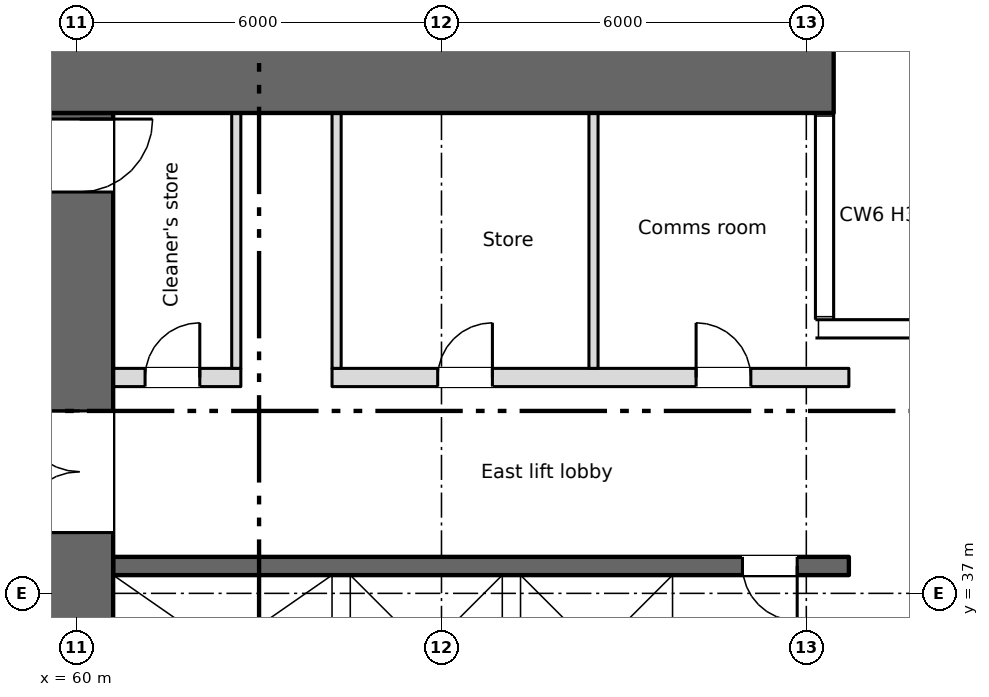
"""IFC4 building model, lengths in metres.
Left out: names, types, materials, properties, quantities, classifications, styles, units other than length and angle.
Written with IfcOpenShell. Run it as: python <this file> out.ifc"""

import sys

from ifc_helpers import new_model, si_unit, direction, frame, frame_2d, origin, place, context, subcontext, project, spatial, rectangle, extrude, element, fill, save


model = new_model("IFC4")
c1 = context("Model", 3, precision=1e-05, world=origin(), true_north=direction((0.0, 1.0)))
c2 = subcontext(c1, "Body", "Model", "MODEL_VIEW")
j1 = project(units=[si_unit("LENGTHUNIT", "METRE"), si_unit("PLANEANGLEUNIT", "RADIAN")], contexts=[c1])
p1 = place(None, origin())
s1 = spatial("IfcSite", under=j1, at=p1, CompositionType="ELEMENT")
p2 = place(p1, origin())
s2 = spatial("IfcBuilding", under=s1, at=p2, CompositionType="ELEMENT")
p3 = place(p2, frame((0.0, 0.0, 17.9)))
s3 = spatial("IfcBuildingStorey", under=s2, at=p3, CompositionType="ELEMENT", Elevation=17.9)
p4 = place(p3, frame((5.55, 45.45, 0.0), z_axis=(0.0, 0.0, 1.0), x_axis=(1.0, 0.0, 0.0)))
e1 = element("IfcWall", 1, at=p4, inside=s3, PredefinedType="SHEAR", context=c2, shape_type="SweptSolid", body=[
    extrude(rectangle(XDim=66.9, YDim=1.1, at=frame_2d((33.45, 0.0))), origin(), (0.0, 0.0, 1.0), 3.8),
])
p5 = place(p4, frame((1.2, 0.0, 0.6)))
e2 = element("IfcOpeningElement", 2, at=p5, cuts=e1, PredefinedType="OPENING", context=c2, shape_type="SweptSolid", body=[
    extrude(rectangle(XDim=0.6, YDim=2.7, at=frame_2d((0.3, 1.35))), frame((0.0, 0.56, 0.0), z_axis=(0.0, -1.0, 0.0), x_axis=(1.0, 0.0, 0.0)), (0.0, 0.0, 1.0), 1.12),
])
p6 = place(p4, frame((7.2, 0.0, 0.6)))
e3 = element("IfcOpeningElement", 3, at=p6, cuts=e1, PredefinedType="OPENING", context=c2, shape_type="SweptSolid", body=[
    extrude(rectangle(XDim=0.6, YDim=2.7, at=frame_2d((0.3, 1.35))), frame((0.0, 0.56, 0.0), z_axis=(0.0, -1.0, 0.0), x_axis=(1.0, 0.0, 0.0)), (0.0, 0.0, 1.0), 1.12),
])
p7 = place(p3, frame((72.85, 28.4, 0.0), z_axis=(0.0, 0.0, 1.0), x_axis=(0.0, 1.0, 0.0)))
e4 = element("IfcWall", 4, at=p7, inside=s3, PredefinedType="SHEAR", context=c2, shape_type="SweptSolid", body=[
    extrude(rectangle(XDim=12.85, YDim=0.3, at=frame_2d((6.425, 0.0))), origin(), (0.0, 0.0, 1.0), 3.8),
])
p8 = place(p3, frame((64.35, 34.8, 0.0), z_axis=(0.0, 0.0, 1.0), x_axis=(0.0, 1.0, 0.0)))
e5 = element("IfcWall", 5, at=p8, inside=s3, PredefinedType="SHEAR", context=c2, shape_type="SweptSolid", body=[
    extrude(rectangle(XDim=2.5, YDim=0.3, at=frame_2d((1.25, 0.0))), origin(), (0.0, 0.0, 1.0), 3.8),
])
p9 = place(p3, frame((60.05, 28.4, 0.0), z_axis=(0.0, 0.0, 1.0), x_axis=(0.0, 1.0, 0.0)))
e6 = element("IfcWall", 6, at=p9, inside=s3, PredefinedType="SHEAR", context=c2, shape_type="SweptSolid", body=[
    extrude(rectangle(XDim=16.5, YDim=1.1, at=frame_2d((8.25, 0.0))), origin(), (0.0, 0.0, 1.0), 3.8),
])
p10 = place(p9, frame((9.6, 0.0, 0.0)))
e7 = element("IfcOpeningElement", 7, at=p10, cuts=e6, PredefinedType="OPENING", context=c2, shape_type="SweptSolid", body=[
    extrude(rectangle(XDim=2.0, YDim=2.1, at=frame_2d((1.0, 1.05))), frame((0.0, 0.56, 0.0), z_axis=(0.0, -1.0, 0.0), x_axis=(1.0, 0.0, 0.0)), (0.0, 0.0, 1.0), 1.12),
])
p11 = place(p9, frame((15.2, 0.0, 0.0)))
e8 = element("IfcOpeningElement", 8, at=p11, cuts=e6, PredefinedType="OPENING", context=c2, shape_type="SweptSolid", body=[
    extrude(rectangle(XDim=1.2, YDim=2.1, at=frame_2d((0.6, 1.05))), frame((0.0, 0.56, 0.0), z_axis=(0.0, -1.0, 0.0), x_axis=(1.0, 0.0, 0.0)), (0.0, 0.0, 1.0), 1.12),
])
p12 = place(p3, frame((72.7, 37.45, 0.0), z_axis=(0.0, 0.0, 1.0), x_axis=(-1.0, 0.0, 0.0)))
e9 = element("IfcWall", 9, at=p12, inside=s3, PredefinedType="SHEAR", context=c2, shape_type="SweptSolid", body=[
    extrude(rectangle(XDim=12.1, YDim=0.3, at=frame_2d((6.05, 0.0))), origin(), (0.0, 0.0, 1.0), 3.8),
])
p13 = place(p12, frame((0.85, 0.0, 0.0)))
e10 = element("IfcOpeningElement", 10, at=p13, cuts=e9, PredefinedType="OPENING", context=c2, shape_type="SweptSolid", body=[
    extrude(rectangle(XDim=0.9, YDim=2.1, at=frame_2d((0.45, 1.05))), frame((0.0, 0.16, 0.0), z_axis=(0.0, -1.0, 0.0), x_axis=(1.0, 0.0, 0.0)), (0.0, 0.0, 1.0), 0.32),
])
p14 = place(p12, frame((9.75, 0.0, 0.0)))
e11 = element("IfcOpeningElement", 11, at=p14, cuts=e9, PredefinedType="OPENING", context=c2, shape_type="SweptSolid", body=[
    extrude(rectangle(XDim=1.1, YDim=2.1, at=frame_2d((0.55, 1.05))), frame((0.0, 0.16, 0.0), z_axis=(0.0, -1.0, 0.0), x_axis=(1.0, 0.0, 0.0)), (0.0, 0.0, 1.0), 0.32),
])
p15 = place(p12, frame((6.4, 0.0, 0.0)))
e12 = element("IfcOpeningElement", 12, at=p15, cuts=e9, PredefinedType="OPENING", context=c2, shape_type="SweptSolid", body=[
    extrude(rectangle(XDim=1.1, YDim=2.1, at=frame_2d((0.55, 1.05))), frame((0.0, 0.16, 0.0), z_axis=(0.0, -1.0, 0.0), x_axis=(1.0, 0.0, 0.0)), (0.0, 0.0, 1.0), 0.32),
])
p16 = place(p12, frame((3.6, 0.0, 0.0)))
e13 = element("IfcOpeningElement", 13, at=p16, cuts=e9, PredefinedType="OPENING", context=c2, shape_type="SweptSolid", body=[
    extrude(rectangle(XDim=1.1, YDim=2.1, at=frame_2d((0.55, 1.05))), frame((0.0, 0.16, 0.0), z_axis=(0.0, -1.0, 0.0), x_axis=(1.0, 0.0, 0.0)), (0.0, 0.0, 1.0), 0.32),
])
p17 = place(p3, frame((60.6, 40.55, 0.0), z_axis=(0.0, 0.0, 1.0), x_axis=(1.0, 0.0, 0.0)))
e14 = element("IfcWall", 14, at=p17, inside=s3, PredefinedType="PARTITIONING", context=c2, shape_type="SweptSolid", body=[
    extrude(rectangle(XDim=2.1, YDim=0.3, at=frame_2d((1.05, 0.0))), origin(), (0.0, 0.0, 1.0), 3.8),
])
p18 = place(p17, frame((0.525, 0.0, 0.0)))
e15 = element("IfcOpeningElement", 15, at=p18, cuts=e14, PredefinedType="OPENING", context=c2, shape_type="SweptSolid", body=[
    extrude(rectangle(XDim=0.9, YDim=2.1, at=frame_2d((0.45, 1.05))), frame((0.0, 0.16, 0.0), z_axis=(0.0, -1.0, 0.0), x_axis=(1.0, 0.0, 0.0)), (0.0, 0.0, 1.0), 0.32),
])
p19 = place(p3, frame((64.2, 40.55, 0.0), z_axis=(0.0, 0.0, 1.0), x_axis=(1.0, 0.0, 0.0)))
e16 = element("IfcWall", 16, at=p19, inside=s3, PredefinedType="PARTITIONING", context=c2, shape_type="SweptSolid", body=[
    extrude(rectangle(XDim=8.5, YDim=0.3, at=frame_2d((4.25, 0.0))), origin(), (0.0, 0.0, 1.0), 3.8),
])
p20 = place(p19, frame((1.738, 0.0, 0.0)))
e17 = element("IfcOpeningElement", 17, at=p20, cuts=e16, PredefinedType="OPENING", context=c2, shape_type="SweptSolid", body=[
    extrude(rectangle(XDim=0.9, YDim=2.1, at=frame_2d((0.45, 1.05))), frame((0.0, 0.16, 0.0), z_axis=(0.0, -1.0, 0.0), x_axis=(1.0, 0.0, 0.0)), (0.0, 0.0, 1.0), 0.32),
])
p21 = place(p19, frame((5.988, 0.0, 0.0)))
e18 = element("IfcOpeningElement", 18, at=p21, cuts=e16, PredefinedType="OPENING", context=c2, shape_type="SweptSolid", body=[
    extrude(rectangle(XDim=0.9, YDim=2.1, at=frame_2d((0.45, 1.05))), frame((0.0, 0.16, 0.0), z_axis=(0.0, -1.0, 0.0), x_axis=(1.0, 0.0, 0.0)), (0.0, 0.0, 1.0), 0.32),
])
for number, where, z_axis, x_axis in (
    (19, (67.15, 34.8, 0.0), (0.0, 0.0, 1.0), (0.0, 1.0, 0.0)),
    (20, (69.95, 34.8, 0.0), (0.0, 0.0, 1.0), (0.0, 1.0, 0.0)),
):
    element("IfcWall", number, at=place(p3, frame(where, z_axis=z_axis, x_axis=x_axis)), inside=s3, PredefinedType="SHEAR", context=c2, shape_type="SweptSolid", body=[
        extrude(rectangle(XDim=2.5, YDim=0.3, at=frame_2d((1.25, 0.0))), origin(), (0.0, 0.0, 1.0), 3.8),
    ])
for number, where, z_axis, x_axis in (
    (21, (62.625, 40.7, 0.0), (0.0, 0.0, 1.0), (0.0, 1.0, 0.0)),
    (22, (64.275, 40.7, 0.0), (0.0, 0.0, 1.0), (0.0, 1.0, 0.0)),
    (23, (68.5, 40.7, 0.0), (0.0, 0.0, 1.0), (0.0, 1.0, 0.0)),
):
    element("IfcWall", number, at=place(p3, frame(where, z_axis=z_axis, x_axis=x_axis)), inside=s3, PredefinedType="PARTITIONING", context=c2, shape_type="SweptSolid", body=[
        extrude(rectangle(XDim=4.2, YDim=0.15, at=frame_2d((2.1, 0.0))), origin(), (0.0, 0.0, 1.0), 3.8),
    ])
p22 = place(p18, origin())
e24 = element("IfcDoor", 24, at=p22, inside=s3, OperationType="SINGLE_SWING_RIGHT", PredefinedType="DOOR", context=c2, shape_type="SweptSolid", body=[
    extrude(rectangle(XDim=0.9, YDim=2.1, at=frame_2d((0.45, 1.05))), frame((0.0, 0.025, 0.0), z_axis=(0.0, -1.0, 0.0), x_axis=(1.0, 0.0, 0.0)), (0.0, 0.0, 1.0), 0.05),
])
fill(e15, e24)
p23 = place(p20, origin())
e25 = element("IfcDoor", 25, at=p23, inside=s3, OperationType="SINGLE_SWING_RIGHT", PredefinedType="DOOR", context=c2, shape_type="SweptSolid", body=[
    extrude(rectangle(XDim=0.9, YDim=2.1, at=frame_2d((0.45, 1.05))), frame((0.0, 0.025, 0.0), z_axis=(0.0, -1.0, 0.0), x_axis=(1.0, 0.0, 0.0)), (0.0, 0.0, 1.0), 0.05),
])
fill(e17, e25)
p24 = place(p21, origin())
e26 = element("IfcDoor", 26, at=p24, inside=s3, OperationType="SINGLE_SWING_LEFT", PredefinedType="DOOR", context=c2, shape_type="SweptSolid", body=[
    extrude(rectangle(XDim=0.9, YDim=2.1, at=frame_2d((0.45, 1.05))), frame((0.0, 0.025, 0.0), z_axis=(0.0, -1.0, 0.0), x_axis=(1.0, 0.0, 0.0)), (0.0, 0.0, 1.0), 0.05),
])
fill(e18, e26)
p25 = place(p13, origin())
e27 = element("IfcDoor", 27, at=p25, inside=s3, OperationType="SINGLE_SWING_LEFT", PredefinedType="DOOR", context=c2, shape_type="SweptSolid", body=[
    extrude(rectangle(XDim=0.9, YDim=2.1, at=frame_2d((0.45, 1.05))), frame((0.0, 0.025, 0.0), z_axis=(0.0, -1.0, 0.0), x_axis=(1.0, 0.0, 0.0)), (0.0, 0.0, 1.0), 0.05),
])
fill(e10, e27)
p26 = place(p14, origin())
e28 = element("IfcDoor", 28, at=p26, inside=s3, OperationType="SLIDING_TO_LEFT", PredefinedType="DOOR", context=c2, shape_type="SweptSolid", body=[
    extrude(rectangle(XDim=1.1, YDim=2.1, at=frame_2d((0.55, 1.05))), frame((0.0, 0.025, 0.0), z_axis=(0.0, -1.0, 0.0), x_axis=(1.0, 0.0, 0.0)), (0.0, 0.0, 1.0), 0.05),
])
fill(e11, e28)
p27 = place(p15, origin())
e29 = element("IfcDoor", 29, at=p27, inside=s3, OperationType="SLIDING_TO_LEFT", PredefinedType="DOOR", context=c2, shape_type="SweptSolid", body=[
    extrude(rectangle(XDim=1.1, YDim=2.1, at=frame_2d((0.55, 1.05))), frame((0.0, 0.025, 0.0), z_axis=(0.0, -1.0, 0.0), x_axis=(1.0, 0.0, 0.0)), (0.0, 0.0, 1.0), 0.05),
])
fill(e12, e29)
p28 = place(p16, origin())
e30 = element("IfcDoor", 30, at=p28, inside=s3, OperationType="SLIDING_TO_LEFT", PredefinedType="DOOR", context=c2, shape_type="SweptSolid", body=[
    extrude(rectangle(XDim=1.1, YDim=2.1, at=frame_2d((0.55, 1.05))), frame((0.0, 0.025, 0.0), z_axis=(0.0, -1.0, 0.0), x_axis=(1.0, 0.0, 0.0)), (0.0, 0.0, 1.0), 0.05),
])
fill(e13, e30)
p29 = place(p10, origin())
e31 = element("IfcDoor", 31, at=p29, inside=s3, OperationType="DOUBLE_DOOR_SINGLE_SWING", PredefinedType="DOOR", context=c2, shape_type="SweptSolid", body=[
    extrude(rectangle(XDim=2.0, YDim=2.1, at=frame_2d((1.0, 1.05))), frame((0.0, 0.025, 0.0), z_axis=(0.0, -1.0, 0.0), x_axis=(1.0, 0.0, 0.0)), (0.0, 0.0, 1.0), 0.05),
])
fill(e7, e31)
p30 = place(p11, origin())
e32 = element("IfcDoor", 32, at=p30, inside=s3, OperationType="SINGLE_SWING_RIGHT", PredefinedType="DOOR", context=c2, shape_type="SweptSolid", body=[
    extrude(rectangle(XDim=1.2, YDim=2.1, at=frame_2d((0.6, 1.05))), frame((0.0, 0.025, 0.0), z_axis=(0.0, -1.0, 0.0), x_axis=(1.0, 0.0, 0.0)), (0.0, 0.0, 1.0), 0.05),
])
fill(e8, e32)
save(model, sys.argv[1])
